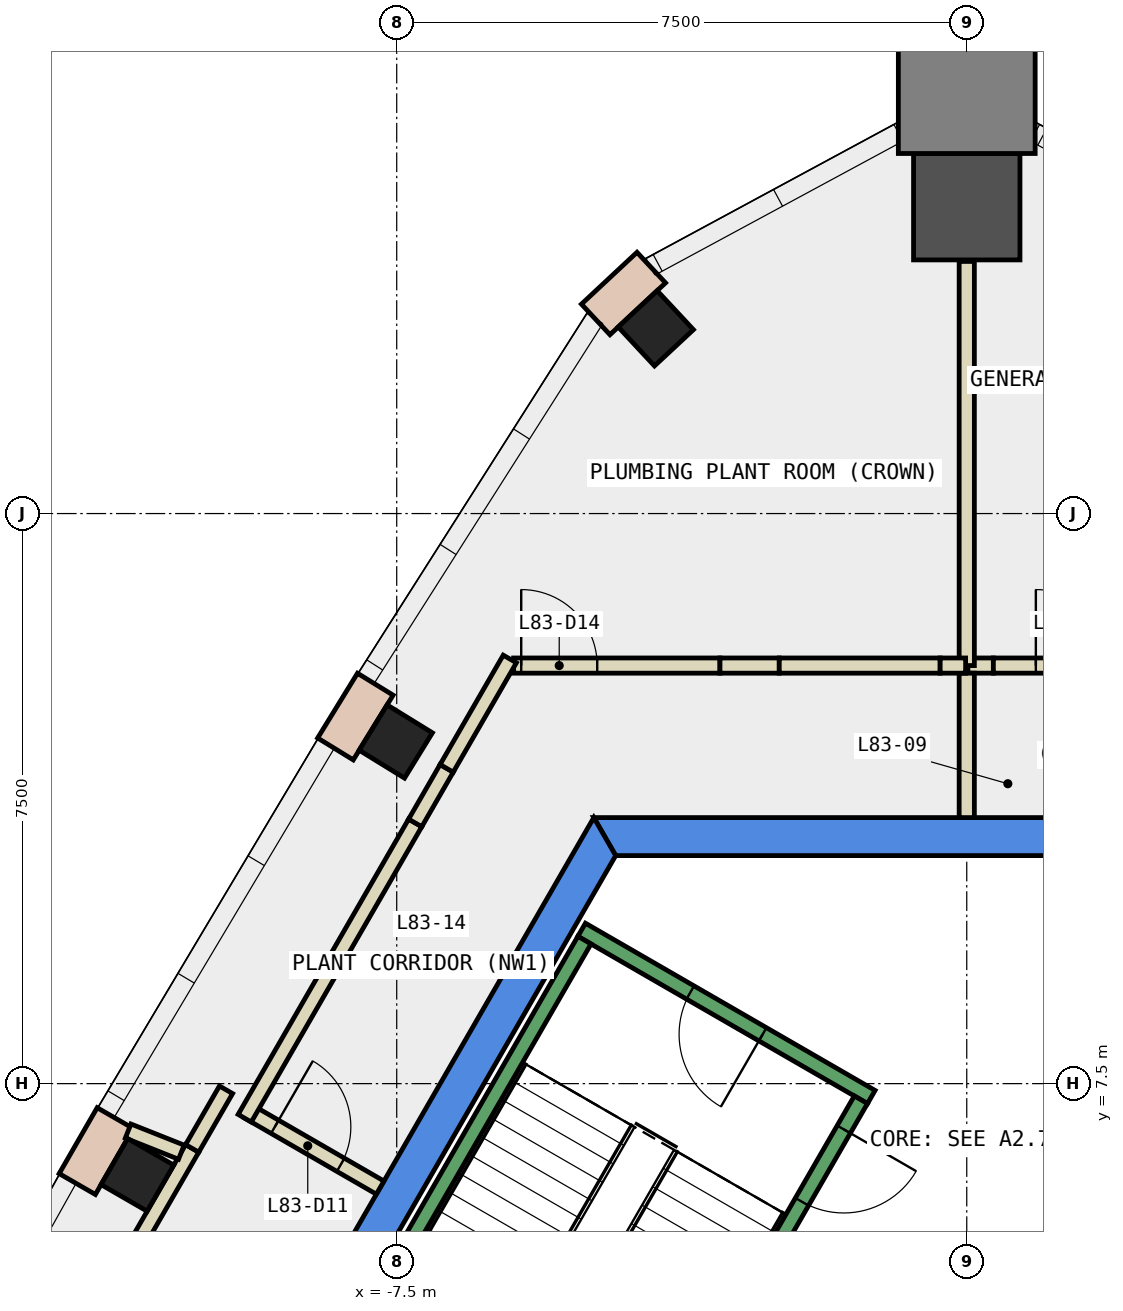
"""IFC4 building model, lengths in metres.
Left out: names, types, materials, properties, quantities, classifications, styles, units other than length and angle.
Written with IfcOpenShell. Run it as: python <this file> out.ifc"""

import sys

from ifc_helpers import new_model, si_unit, direction, frame, frame_2d, origin, origin_2d, place, context, subcontext, project, spatial, polyline, rectangle, outline, extrude, element, fill, save


model = new_model("IFC4")
c1 = context("Model", 3, precision=1e-05, world=origin(), true_north=direction((0.0, 1.0)))
c2 = subcontext(c1, "Body", "Model", "MODEL_VIEW")
j1 = project(units=[si_unit("LENGTHUNIT", "METRE"), si_unit("PLANEANGLEUNIT", "RADIAN")], contexts=[c1])
p1 = place(None, origin())
s1 = spatial("IfcSite", under=j1, at=p1, CompositionType="ELEMENT")
p2 = place(p1, origin())
s2 = spatial("IfcBuilding", under=s1, at=p2, CompositionType="ELEMENT")
p3 = place(p2, frame((0.0, 0.0, 353.9)))
s3 = spatial("IfcBuildingStorey", under=s2, at=p3, CompositionType="ELEMENT", Elevation=353.9)
p4 = place(p3, frame((0.0, 19.037, -0.35), z_axis=(0.0, 0.0, 1.0), x_axis=(0.0, 1.0, 0.0)))
e1 = element("IfcColumn", 1, at=p4, inside=s3, PredefinedType="COLUMN", context=c2, shape_type="SweptSolid", body=[
    extrude(rectangle(XDim=1.4, YDim=1.4, at=origin_2d()), origin(), (0.0, 0.0, 1.0), 4.4),
])
for number, where, z_axis, x_axis in (
    (2, (-4.091, 17.437, -0.35), (0.0, 0.0, 1.0), (0.732, 0.682, 0.0)),
    (3, (-7.512, 12.001, -0.35), (0.0, 0.0, 1.0), (0.524, 0.851, 0.0)),
    (4, (-10.912, 6.3, -0.35), (0.0, 0.0, 1.0), (0.5, 0.866, 0.0)),
):
    element("IfcColumn", number, at=place(p3, frame(where, z_axis=z_axis, x_axis=x_axis)), inside=s3, PredefinedType="COLUMN", context=c2, shape_type="SweptSolid", body=[
        extrude(rectangle(XDim=0.7, YDim=0.7, at=origin_2d()), origin(), (0.0, 0.0, 1.0), 4.4),
    ])
p5 = place(p3, frame((0.0, 20.637, -0.35), z_axis=(0.0, 0.0, 1.0), x_axis=(0.0, 1.0, 0.0)))
e5 = element("IfcColumn", 5, at=p5, inside=s3, PredefinedType="COLUMN", context=c2, shape_type="SweptSolid", body=[
    extrude(rectangle(XDim=1.8, YDim=1.8, at=origin_2d()), origin(), (0.0, 0.0, 1.0), 4.4),
])
p6 = place(p3, frame((0.0, 0.0, -0.35)))
e6 = element("IfcWall", 6, at=p6, inside=s3, PredefinedType="SHEAR", context=c2, shape_type="SweptSolid", body=[
    extrude(outline(polyline([(4.907, 11.0), (-4.907, 11.0), (-4.619, 10.5), (4.619, 10.5), (4.907, 11.0)])), origin(), (0.0, 0.0, 1.0), 4.4),
])
p7 = place(p3, frame((0.0, 0.0, -0.35)))
e7 = element("IfcWall", 7, at=p7, inside=s3, PredefinedType="SHEAR", context=c2, shape_type="SweptSolid", body=[
    extrude(outline(polyline([(-9.236, 3.502), (-8.803, 3.253), (-4.619, 10.5), (-4.907, 11.0), (-9.236, 3.502)])), origin(), (0.0, 0.0, 1.0), 4.4),
])
for number, where, z_axis, x_axis in (
    (8, (-4.151, 18.236, 0.0), (0.0, 0.0, 1.0), (-0.731, -0.682, 0.0)),
    (9, (-7.782, 12.755, 0.0), (0.0, 0.0, 1.0), (-0.524, -0.852, 0.0)),
):
    element("IfcWall", number, at=place(p3, frame(where, z_axis=z_axis, x_axis=x_axis)), inside=s3, PredefinedType="STANDARD", context=c2, shape_type="SweptSolid", body=[
        extrude(rectangle(XDim=1.0, YDim=0.55, at=frame_2d((0.5, 0.0))), origin(), (0.0, 0.0, 1.0), 4.05),
    ])
p8 = place(p3, frame((-11.203, 7.046, 0.0), z_axis=(0.0, 0.0, 1.0), x_axis=(-0.49960277677, -0.866254619292, 0.0)))
e10 = element("IfcWall", 10, at=p8, inside=s3, PredefinedType="STANDARD", context=c2, shape_type="SweptSolid", body=[
    extrude(rectangle(XDim=1.001, YDim=0.55, at=frame_2d((0.5, 0.0))), origin(), (0.0, 0.0, 1.0), 4.05),
])
p9 = place(p3, frame((0.015, 13.0, 0.0), z_axis=(0.0, 0.0, 1.0), x_axis=(1.0, 0.0, 0.0)))
e11 = element("IfcWall", 11, at=p9, inside=s3, PredefinedType="PARTITIONING", context=c2, shape_type="SweptSolid", body=[
    extrude(rectangle(XDim=0.335, YDim=0.2, at=frame_2d((0.167, 0.0))), origin(), (0.0, 0.0, 1.0), 1.95),
])
p10 = place(p3, frame((0.0, 11.0, 0.0), z_axis=(0.0, 0.0, 1.0), x_axis=(0.0, 1.0, 0.0)))
e12 = element("IfcWall", 12, at=p10, inside=s3, PredefinedType="PARTITIONING", context=c2, shape_type="SweptSolid", body=[
    extrude(rectangle(XDim=1.9, YDim=0.2, at=frame_2d((0.95, 0.0))), origin(), (0.0, 0.0, 1.0), 1.95),
])
p11 = place(p3, frame((0.0, 13.0, 0.0), z_axis=(0.0, 0.0, 1.0), x_axis=(0.0, 1.0, 0.0)))
e13 = element("IfcWall", 13, at=p11, inside=s3, PredefinedType="PARTITIONING", context=c2, shape_type="SweptSolid", body=[
    extrude(rectangle(XDim=5.317, YDim=0.2, at=frame_2d((2.658, 0.0))), origin(), (0.0, 0.0, 1.0), 1.95),
])
p12 = place(p3, frame((-9.45, 7.132, 0.0), z_axis=(0.0, 0.0, 1.0), x_axis=(0.866010750942, -0.50002537861, 0.0)))
e14 = element("IfcWall", 14, at=p12, inside=s3, PredefinedType="PARTITIONING", context=c2, shape_type="SweptSolid", body=[
    extrude(rectangle(XDim=2.0, YDim=0.2, at=frame_2d((1.0, 0.0))), origin(), (0.0, 0.0, 1.0), 4.05),
])
p13 = place(p12, frame((0.4, 0.0, 0.0)))
e15 = element("IfcOpeningElement", 15, at=p13, cuts=e14, PredefinedType="OPENING", context=c2, shape_type="SweptSolid", body=[
    extrude(rectangle(XDim=1.0, YDim=2.1, at=frame_2d((0.5, 1.05))), frame((0.0, 0.11, 0.0), z_axis=(0.0, -1.0, 0.0), x_axis=(1.0, 0.0, 0.0)), (0.0, 0.0, 1.0), 0.22),
])
p14 = place(p3, frame((-13.346, 1.183, 0.0), z_axis=(0.0, 0.0, 1.0), x_axis=(0.49998814853, 0.866032246126, 0.0)))
e16 = element("IfcWall", 16, at=p14, inside=s3, PredefinedType="PARTITIONING", context=c2, shape_type="SweptSolid", body=[
    extrude(rectangle(XDim=6.31, YDim=0.2, at=frame_2d((3.155, 0.0))), origin(), (0.0, 0.0, 1.0), 1.95),
])
p15 = place(p3, frame((-10.191, 6.648, 0.0), z_axis=(0.0, 0.0, 1.0), x_axis=(0.49973828311, 0.866176453382, 0.0)))
e17 = element("IfcWall", 17, at=p15, inside=s3, PredefinedType="PARTITIONING", context=c2, shape_type="SweptSolid", body=[
    extrude(rectangle(XDim=0.89, YDim=0.2, at=frame_2d((0.445, 0.0))), origin(), (0.0, 0.0, 1.0), 1.95),
])
p16 = place(p3, frame((-9.5, 7.045, 0.0), z_axis=(0.0, 0.0, 1.0), x_axis=(0.499984700226, 0.866034236933, 0.0)))
e18 = element("IfcWall", 18, at=p16, inside=s3, PredefinedType="PARTITIONING", context=c2, shape_type="SweptSolid", body=[
    extrude(rectangle(XDim=4.486, YDim=0.2, at=frame_2d((2.243, 0.0))), origin(), (0.0, 0.0, 1.0), 4.05),
])
p17 = place(p3, frame((-5.962, 13.0, 0.0), z_axis=(0.0, 0.0, 1.0), x_axis=(1.0, 0.0, 0.0)))
e19 = element("IfcWall", 19, at=p17, inside=s3, PredefinedType="PARTITIONING", context=c2, shape_type="SweptSolid", body=[
    extrude(rectangle(XDim=2.715, YDim=0.2, at=frame_2d((1.357, 0.0))), origin(), (0.0, 0.0, 1.0), 4.05),
])
p18 = place(p17, frame((0.1, 0.0, 0.0)))
e20 = element("IfcOpeningElement", 20, at=p18, cuts=e19, PredefinedType="OPENING", context=c2, shape_type="SweptSolid", body=[
    extrude(rectangle(XDim=1.0, YDim=2.1, at=frame_2d((0.5, 1.05))), frame((0.0, 0.11, 0.0), z_axis=(0.0, -1.0, 0.0), x_axis=(1.0, 0.0, 0.0)), (0.0, 0.0, 1.0), 0.22),
])
p19 = place(p3, frame((-11.034, 6.876, 0.0), z_axis=(0.0, 0.0, 1.0), x_axis=(0.929345991637, -0.369210005049, 0.0)))
e21 = element("IfcWall", 21, at=p19, inside=s3, PredefinedType="PARTITIONING", context=c2, shape_type="SweptSolid", body=[
    extrude(rectangle(XDim=0.753, YDim=0.2, at=frame_2d((0.376, 0.0))), origin(), (0.0, 0.0, 1.0), 1.95),
])
p20 = place(p3, frame((0.35, 13.0, 0.0), z_axis=(0.0, 0.0, 1.0), x_axis=(1.0, 0.0, 0.0)))
e22 = element("IfcWall", 22, at=p20, inside=s3, PredefinedType="PARTITIONING", context=c2, shape_type="SweptSolid", body=[
    extrude(rectangle(XDim=2.117, YDim=0.2, at=frame_2d((1.059, 0.0))), origin(), (0.0, 0.0, 1.0), 4.05),
])
p21 = place(p20, frame((0.559, 0.0, 0.0)))
e23 = element("IfcOpeningElement", 23, at=p21, cuts=e22, PredefinedType="OPENING", context=c2, shape_type="SweptSolid", body=[
    extrude(rectangle(XDim=1.0, YDim=2.1, at=frame_2d((0.5, 1.05))), frame((0.0, 0.11, 0.0), z_axis=(0.0, -1.0, 0.0), x_axis=(1.0, 0.0, 0.0)), (0.0, 0.0, 1.0), 0.22),
])
p22 = place(p3, frame((-7.257, 10.93, 0.0), z_axis=(0.0, 0.0, 1.0), x_axis=(0.499560947681, 0.866278742411, 0.0)))
e24 = element("IfcWall", 24, at=p22, inside=s3, PredefinedType="PARTITIONING", context=c2, shape_type="SweptSolid", body=[
    extrude(rectangle(XDim=0.829, YDim=0.2, at=frame_2d((0.415, 0.0))), origin(), (0.0, 0.0, 1.0), 1.95),
])
p23 = place(p3, frame((-6.843, 11.648, 0.0), z_axis=(0.0, 0.0, 1.0), x_axis=(0.500120931396, 0.865955572752, 0.0)))
e25 = element("IfcWall", 25, at=p23, inside=s3, PredefinedType="PARTITIONING", context=c2, shape_type="SweptSolid", body=[
    extrude(rectangle(XDim=1.662, YDim=0.2, at=frame_2d((0.831, 0.0))), origin(), (0.0, 0.0, 1.0), 4.05),
])
p24 = place(p3, frame((-3.247, 13.0, 0.0), z_axis=(0.0, 0.0, 1.0), x_axis=(1.0, 0.0, 0.0)))
e26 = element("IfcWall", 26, at=p24, inside=s3, PredefinedType="PARTITIONING", context=c2, shape_type="SweptSolid", body=[
    extrude(rectangle(XDim=0.78, YDim=0.2, at=frame_2d((0.39, 0.0))), origin(), (0.0, 0.0, 1.0), 1.95),
])
p25 = place(p3, frame((-2.467, 13.0, 0.0), z_axis=(0.0, 0.0, 1.0), x_axis=(1.0, 0.0, 0.0)))
e27 = element("IfcWall", 27, at=p25, inside=s3, PredefinedType="PARTITIONING", context=c2, shape_type="SweptSolid", body=[
    extrude(rectangle(XDim=2.117, YDim=0.2, at=frame_2d((1.059, 0.0))), origin(), (0.0, 0.0, 1.0), 4.05),
])
p26 = place(p3, frame((-0.35, 13.0, 0.0), z_axis=(0.0, 0.0, 1.0), x_axis=(1.0, 0.0, 0.0)))
e28 = element("IfcWall", 28, at=p26, inside=s3, PredefinedType="PARTITIONING", context=c2, shape_type="SweptSolid", body=[
    extrude(rectangle(XDim=0.335, YDim=0.2, at=frame_2d((0.167, 0.0))), origin(), (0.0, 0.0, 1.0), 1.95),
])
p27 = place(p3, frame((-1.256, 7.324, 0.0), z_axis=(0.0, 0.0, 1.0), x_axis=(-0.866046073146, 0.499964197906, 0.0)))
e29 = element("IfcWall", 29, at=p27, inside=s3, PredefinedType="STANDARD", context=c2, shape_type="SweptSolid", body=[
    extrude(rectangle(XDim=4.4, YDim=0.2, at=frame_2d((2.2, 0.0))), origin(), (0.0, 0.0, 1.0), 4.05),
])
p28 = place(p27, frame((1.65, 0.0, 0.0)))
e30 = element("IfcOpeningElement", 30, at=p28, cuts=e29, PredefinedType="OPENING", context=c2, shape_type="SweptSolid", body=[
    extrude(rectangle(XDim=1.1, YDim=2.2, at=frame_2d((0.55, 1.1))), frame((0.0, 0.11, 0.0), z_axis=(0.0, -1.0, 0.0), x_axis=(1.0, 0.0, 0.0)), (0.0, 0.0, 1.0), 0.22),
])
p29 = place(p3, frame((-1.393, 7.288, 0.0), z_axis=(0.0, 0.0, 1.0), x_axis=(-0.499963383562, -0.866046543262, 0.0)))
e31 = element("IfcWall", 31, at=p29, inside=s3, PredefinedType="STANDARD", context=c2, shape_type="SweptSolid", body=[
    extrude(rectangle(XDim=6.9, YDim=0.2, at=frame_2d((3.45, 0.0))), origin(), (0.0, 0.0, 1.0), 4.05),
])
p30 = place(p29, frame((0.45, 0.0, 0.0)))
e32 = element("IfcOpeningElement", 32, at=p30, cuts=e31, PredefinedType="OPENING", context=c2, shape_type="SweptSolid", body=[
    extrude(rectangle(XDim=1.1, YDim=2.2, at=frame_2d((0.55, 1.1))), frame((0.0, 0.11, 0.0), z_axis=(0.0, -1.0, 0.0), x_axis=(1.0, 0.0, 0.0)), (0.0, 0.0, 1.0), 0.22),
])
p31 = place(p3, frame((-5.03, 9.388, 0.0), z_axis=(0.0, 0.0, 1.0), x_axis=(-0.499978703459, -0.866037698999, 0.0)))
e33 = element("IfcWall", 33, at=p31, inside=s3, PredefinedType="STANDARD", context=c2, shape_type="SweptSolid", body=[
    extrude(rectangle(XDim=6.9, YDim=0.2, at=frame_2d((3.45, 0.0))), origin(), (0.0, 0.0, 1.0), 4.05),
])
p32 = place(p21, origin())
e34 = element("IfcDoor", 34, at=p32, inside=s3, OperationType="SINGLE_SWING_LEFT", PredefinedType="DOOR", context=c2, shape_type="SweptSolid", body=[
    extrude(rectangle(XDim=1.0, YDim=2.1, at=frame_2d((0.5, 1.05))), frame((0.0, 0.025, 0.0), z_axis=(0.0, -1.0, 0.0), x_axis=(1.0, 0.0, 0.0)), (0.0, 0.0, 1.0), 0.05),
])
fill(e23, e34)
p33 = place(p13, origin())
e35 = element("IfcDoor", 35, at=p33, inside=s3, OperationType="SINGLE_SWING_LEFT", PredefinedType="DOOR", context=c2, shape_type="SweptSolid", body=[
    extrude(rectangle(XDim=1.0, YDim=2.1, at=frame_2d((0.5, 1.05))), frame((0.0, 0.025, 0.0), z_axis=(0.0, -1.0, 0.0), x_axis=(1.0, 0.0, 0.0)), (0.0, 0.0, 1.0), 0.05),
])
fill(e15, e35)
p34 = place(p18, origin())
e36 = element("IfcDoor", 36, at=p34, inside=s3, OperationType="SINGLE_SWING_RIGHT", PredefinedType="DOOR", context=c2, shape_type="SweptSolid", body=[
    extrude(rectangle(XDim=1.0, YDim=2.1, at=frame_2d((0.5, 1.05))), frame((0.0, 0.025, 0.0), z_axis=(0.0, -1.0, 0.0), x_axis=(1.0, 0.0, 0.0)), (0.0, 0.0, 1.0), 0.05),
])
fill(e20, e36)
p35 = place(p30, origin())
e37 = element("IfcDoor", 37, at=p35, inside=s3, OperationType="SINGLE_SWING_LEFT", PredefinedType="DOOR", context=c2, shape_type="SweptSolid", body=[
    extrude(rectangle(XDim=1.1, YDim=2.2, at=frame_2d((0.55, 1.1))), frame((0.0, 0.025, 0.0), z_axis=(0.0, -1.0, 0.0), x_axis=(1.0, 0.0, 0.0)), (0.0, 0.0, 1.0), 0.05),
])
fill(e32, e37)
p36 = place(p28, origin())
e38 = element("IfcDoor", 38, at=p36, inside=s3, OperationType="SINGLE_SWING_LEFT", PredefinedType="DOOR", context=c2, shape_type="SweptSolid", body=[
    extrude(rectangle(XDim=1.1, YDim=2.2, at=frame_2d((0.55, 1.1))), frame((0.0, 0.025, 0.0), z_axis=(0.0, -1.0, 0.0), x_axis=(1.0, 0.0, 0.0)), (0.0, 0.0, 1.0), 0.05),
])
fill(e30, e38)
save(model, sys.argv[1])
